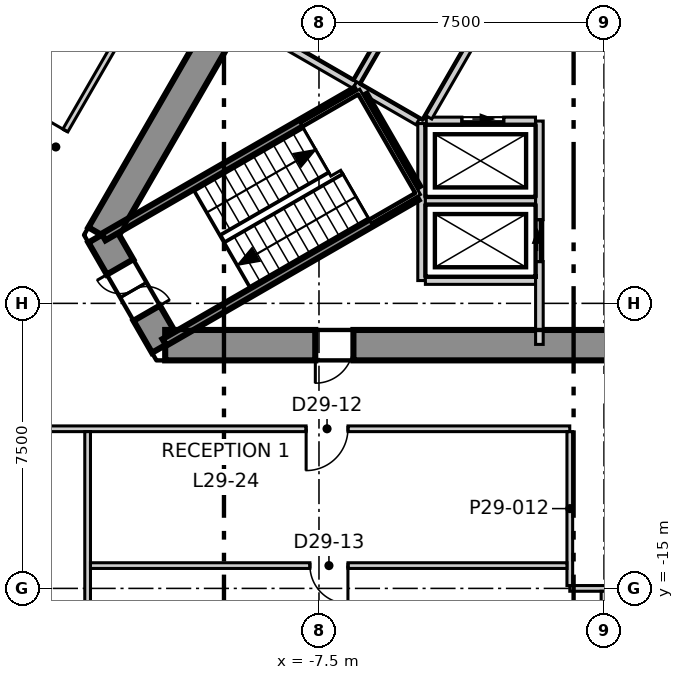
"""IFC4 building model, lengths in metres.
Left out: names, types, materials, properties, quantities, classifications, styles, units other than length and angle.
Written with IfcOpenShell. Run it as: python <this file> out.ifc"""

import sys

from ifc_helpers import new_model, si_unit, direction, frame, frame_2d, origin, place, context, subcontext, project, spatial, polyline, rectangle, outline, extrude, element, fill, save


model = new_model("IFC4")
c1 = context("Model", 3, precision=1e-05, world=origin(), true_north=direction((0.0, 1.0)))
c2 = subcontext(c1, "Body", "Model", "MODEL_VIEW")
j1 = project(units=[si_unit("LENGTHUNIT", "METRE"), si_unit("PLANEANGLEUNIT", "RADIAN")], contexts=[c1])
p1 = place(None, origin())
s1 = spatial("IfcSite", under=j1, at=p1, CompositionType="ELEMENT")
p2 = place(p1, origin())
s2 = spatial("IfcBuilding", under=s1, at=p2, CompositionType="ELEMENT")
p3 = place(p2, frame((0.0, 0.0, 128.3)))
s3 = spatial("IfcBuildingStorey", under=s2, at=p3, CompositionType="ELEMENT", Elevation=128.3)
p4 = place(p3, frame((-1.674, 14.3, -0.3), z_axis=(0.0, 0.0, 1.0), x_axis=(-0.499995765644, -0.866027848477, 0.0)))
e1 = element("IfcWall", 1, at=p4, inside=s3, PredefinedType="SHEAR", context=c2, shape_type="SweptSolid", body=[
    extrude(outline(polyline([(-0.231, -0.4), (1.732, -0.4), (3.695, -0.4), (5.658, -0.4), (7.621, -0.4), (9.584, -0.4), (11.547, -0.4), (13.51, -0.4), (15.473, -0.4), (17.436, -0.4), (19.399, -0.4), (21.362, -0.4), (23.325, -0.4), (22.863, 0.4), (20.977, 0.4), (19.091, 0.4), (17.205, 0.4), (15.319, 0.4), (13.433, 0.4), (11.547, 0.4), (9.661, 0.4), (7.775, 0.4), (5.889, 0.4), (4.003, 0.4), (2.117, 0.4), (0.231, 0.4), (-0.231, -0.4)])), origin(), (0.0, 0.0, 1.0), 4.0),
])
p5 = place(p4, frame((10.997, 0.0, 0.3)))
e2 = element("IfcOpeningElement", 2, at=p5, cuts=e1, PredefinedType="OPENING", context=c2, shape_type="SweptSolid", body=[
    extrude(rectangle(XDim=1.1, YDim=2.1, at=frame_2d((0.55, 1.05))), frame((0.0, 0.41, 0.0), z_axis=(0.0, -1.0, 0.0), x_axis=(1.0, 0.0, 0.0)), (0.0, 0.0, 1.0), 0.82),
])
p6 = place(p4, frame((5.444, 0.0, 0.3)))
e3 = element("IfcOpeningElement", 3, at=p6, cuts=e1, PredefinedType="OPENING", context=c2, shape_type="SweptSolid", body=[
    extrude(rectangle(XDim=0.9, YDim=2.1, at=frame_2d((0.45, 1.05))), frame((0.0, 0.41, 0.0), z_axis=(0.0, -1.0, 0.0), x_axis=(1.0, 0.0, 0.0)), (0.0, 0.0, 1.0), 0.82),
])
p7 = place(p3, frame((-13.221, -5.7, -0.3), z_axis=(0.0, 0.0, 1.0), x_axis=(0.49987182685, -0.866099391942, 0.0)))
e4 = element("IfcWall", 4, at=p7, inside=s3, PredefinedType="SHEAR", context=c2, shape_type="SweptSolid", body=[
    extrude(outline(polyline([(-0.231, -0.4), (1.674, -0.4), (3.579, -0.4), (3.118, 0.4), (1.674, 0.4), (0.231, 0.4), (-0.231, -0.4)])), origin(), (0.0, 0.0, 1.0), 4.0),
])
p8 = place(p7, frame((0.974, 0.0, 0.3)))
e5 = element("IfcOpeningElement", 5, at=p8, cuts=e4, PredefinedType="OPENING", context=c2, shape_type="SweptSolid", body=[
    extrude(rectangle(XDim=1.4, YDim=2.1, at=frame_2d((0.7, 1.05))), frame((0.0, 0.41, 0.0), z_axis=(0.0, -1.0, 0.0), x_axis=(1.0, 0.0, 0.0)), (0.0, 0.0, 1.0), 0.82),
])
p9 = place(p3, frame((-11.547, -8.6, -0.3), z_axis=(0.0, 0.0, 1.0), x_axis=(1.0, 0.0, 0.0)))
e6 = element("IfcWall", 6, at=p9, inside=s3, PredefinedType="SHEAR", context=c2, shape_type="SweptSolid", body=[
    extrude(outline(polyline([(-0.231, -0.4), (1.732, -0.4), (3.695, -0.4), (5.658, -0.4), (7.621, -0.4), (9.584, -0.4), (11.547, -0.4), (13.51, -0.4), (15.473, -0.4), (17.436, -0.4), (19.399, -0.4), (21.362, -0.4), (23.325, -0.4), (22.863, 0.4), (20.977, 0.4), (19.091, 0.4), (17.205, 0.4), (15.319, 0.4), (13.433, 0.4), (11.547, 0.4), (9.661, 0.4), (7.775, 0.4), (5.889, 0.4), (4.003, 0.4), (2.117, 0.4), (0.231, 0.4), (-0.231, -0.4)])), origin(), (0.0, 0.0, 1.0), 4.0),
])
p10 = place(p9, frame((3.951, 0.0, 0.3)))
e7 = element("IfcOpeningElement", 7, at=p10, cuts=e6, PredefinedType="OPENING", context=c2, shape_type="SweptSolid", body=[
    extrude(rectangle(XDim=1.0, YDim=2.1, at=frame_2d((0.5, 1.05))), frame((0.0, 0.41, 0.0), z_axis=(0.0, -1.0, 0.0), x_axis=(1.0, 0.0, 0.0)), (0.0, 0.0, 1.0), 0.82),
])
p11 = place(p9, frame((17.722, 0.0, 0.3)))
e8 = element("IfcOpeningElement", 8, at=p11, cuts=e6, PredefinedType="OPENING", context=c2, shape_type="SweptSolid", body=[
    extrude(rectangle(XDim=0.9, YDim=2.1, at=frame_2d((0.45, 1.05))), frame((0.0, 0.41, 0.0), z_axis=(0.0, -1.0, 0.0), x_axis=(1.0, 0.0, 0.0)), (0.0, 0.0, 1.0), 0.82),
])
p12 = place(p3, frame((-3.109, 34.679, 0.0), z_axis=(0.0, 0.0, 1.0), x_axis=(-0.50000689325, -0.866021423928, 0.0)))
e9 = element("IfcWall", 9, at=p12, inside=s3, PredefinedType="ELEMENTEDWALL", context=c2, shape_type="SweptSolid", body=[
    extrude(rectangle(XDim=56.937, YDim=0.2, at=frame_2d((28.469, 0.0))), origin(), (0.0, 0.0, 1.0), 3.7),
])
p13 = place(p12, frame((2.249, 0.0, 0.9)))
e10 = element("IfcOpeningElement", 10, at=p13, cuts=e9, PredefinedType="OPENING", context=c2, shape_type="SweptSolid", body=[
    extrude(rectangle(XDim=4.9, YDim=2.5, at=frame_2d((2.45, 1.25))), frame((0.0, 0.11, 0.0), z_axis=(0.0, -1.0, 0.0), x_axis=(1.0, 0.0, 0.0)), (0.0, 0.0, 1.0), 0.22),
])
p14 = place(p12, frame((9.043, 0.0, 0.9)))
e11 = element("IfcOpeningElement", 11, at=p14, cuts=e9, PredefinedType="OPENING", context=c2, shape_type="SweptSolid", body=[
    extrude(rectangle(XDim=4.9, YDim=2.5, at=frame_2d((2.45, 1.25))), frame((0.0, 0.11, 0.0), z_axis=(0.0, -1.0, 0.0), x_axis=(1.0, 0.0, 0.0)), (0.0, 0.0, 1.0), 0.22),
])
p15 = place(p12, frame((15.837, 0.0, 0.9)))
e12 = element("IfcOpeningElement", 12, at=p15, cuts=e9, PredefinedType="OPENING", context=c2, shape_type="SweptSolid", body=[
    extrude(rectangle(XDim=4.9, YDim=2.5, at=frame_2d((2.45, 1.25))), frame((0.0, 0.11, 0.0), z_axis=(0.0, -1.0, 0.0), x_axis=(1.0, 0.0, 0.0)), (0.0, 0.0, 1.0), 0.22),
])
p16 = place(p12, frame((22.631, 0.0, 0.9)))
e13 = element("IfcOpeningElement", 13, at=p16, cuts=e9, PredefinedType="OPENING", context=c2, shape_type="SweptSolid", body=[
    extrude(rectangle(XDim=4.9, YDim=2.5, at=frame_2d((2.45, 1.25))), frame((0.0, 0.11, 0.0), z_axis=(0.0, -1.0, 0.0), x_axis=(1.0, 0.0, 0.0)), (0.0, 0.0, 1.0), 0.22),
])
p17 = place(p12, frame((29.425, 0.0, 0.9)))
e14 = element("IfcOpeningElement", 14, at=p17, cuts=e9, PredefinedType="OPENING", context=c2, shape_type="SweptSolid", body=[
    extrude(rectangle(XDim=4.9, YDim=2.5, at=frame_2d((2.45, 1.25))), frame((0.0, 0.11, 0.0), z_axis=(0.0, -1.0, 0.0), x_axis=(1.0, 0.0, 0.0)), (0.0, 0.0, 1.0), 0.22),
])
p18 = place(p12, frame((36.219, 0.0, 0.9)))
e15 = element("IfcOpeningElement", 15, at=p18, cuts=e9, PredefinedType="OPENING", context=c2, shape_type="SweptSolid", body=[
    extrude(rectangle(XDim=4.9, YDim=2.5, at=frame_2d((2.45, 1.25))), frame((0.0, 0.11, 0.0), z_axis=(0.0, -1.0, 0.0), x_axis=(1.0, 0.0, 0.0)), (0.0, 0.0, 1.0), 0.22),
])
p19 = place(p12, frame((43.013, 0.0, 0.9)))
e16 = element("IfcOpeningElement", 16, at=p19, cuts=e9, PredefinedType="OPENING", context=c2, shape_type="SweptSolid", body=[
    extrude(rectangle(XDim=4.9, YDim=2.5, at=frame_2d((2.45, 1.25))), frame((0.0, 0.11, 0.0), z_axis=(0.0, -1.0, 0.0), x_axis=(1.0, 0.0, 0.0)), (0.0, 0.0, 1.0), 0.22),
])
p20 = place(p12, frame((49.807, 0.0, 0.9)))
e17 = element("IfcOpeningElement", 17, at=p20, cuts=e9, PredefinedType="OPENING", context=c2, shape_type="SweptSolid", body=[
    extrude(rectangle(XDim=4.9, YDim=2.5, at=frame_2d((2.45, 1.25))), frame((0.0, 0.11, 0.0), z_axis=(0.0, -1.0, 0.0), x_axis=(1.0, 0.0, 0.0)), (0.0, 0.0, 1.0), 0.22),
])
p21 = place(p3, frame((-18.556, -10.8, 0.0), z_axis=(0.0, 0.0, 1.0), x_axis=(1.0, 0.0, 0.0)))
e18 = element("IfcWall", 18, at=p21, inside=s3, PredefinedType="PARTITIONING", context=c2, shape_type="SweptSolid", body=[
    extrude(rectangle(XDim=17.655, YDim=0.15, at=frame_2d((8.828, 0.0))), origin(), (0.0, 0.0, 1.0), 3.7),
])
p22 = place(p21, frame((1.9, 0.0, 0.0)))
e19 = element("IfcOpeningElement", 19, at=p22, cuts=e18, PredefinedType="OPENING", context=c2, shape_type="SweptSolid", body=[
    extrude(rectangle(XDim=1.1, YDim=2.1, at=frame_2d((0.55, 1.05))), frame((0.0, 0.085, 0.0), z_axis=(0.0, -1.0, 0.0), x_axis=(1.0, 0.0, 0.0)), (0.0, 0.0, 1.0), 0.17),
])
p23 = place(p21, frame((10.718, 0.0, 0.0)))
e20 = element("IfcOpeningElement", 20, at=p23, cuts=e18, PredefinedType="OPENING", context=c2, shape_type="SweptSolid", body=[
    extrude(rectangle(XDim=1.1, YDim=2.1, at=frame_2d((0.55, 1.05))), frame((0.0, 0.085, 0.0), z_axis=(0.0, -1.0, 0.0), x_axis=(1.0, 0.0, 0.0)), (0.0, 0.0, 1.0), 0.17),
])
p24 = place(p3, frame((-18.631, -10.67, 0.0), z_axis=(0.0, 0.0, 1.0), x_axis=(0.499976222121, 0.866039131514, 0.0)))
e21 = element("IfcWall", 21, at=p24, inside=s3, PredefinedType="PARTITIONING", context=c2, shape_type="SweptSolid", body=[
    extrude(rectangle(XDim=17.655, YDim=0.15, at=frame_2d((8.828, 0.0))), origin(), (0.0, 0.0, 1.0), 3.7),
])
p25 = place(p24, frame((14.206, 0.0, 0.0)))
e22 = element("IfcOpeningElement", 22, at=p25, cuts=e21, PredefinedType="OPENING", context=c2, shape_type="SweptSolid", body=[
    extrude(rectangle(XDim=1.0, YDim=2.1, at=frame_2d((0.5, 1.05))), frame((0.0, 0.085, 0.0), z_axis=(0.0, -1.0, 0.0), x_axis=(1.0, 0.0, 0.0)), (0.0, 0.0, 1.0), 0.17),
])
p26 = place(p24, frame((7.912, 0.0, 0.0)))
e23 = element("IfcOpeningElement", 23, at=p26, cuts=e21, PredefinedType="OPENING", context=c2, shape_type="SweptSolid", body=[
    extrude(rectangle(XDim=1.0, YDim=2.1, at=frame_2d((0.5, 1.05))), frame((0.0, 0.085, 0.0), z_axis=(0.0, -1.0, 0.0), x_axis=(1.0, 0.0, 0.0)), (0.0, 0.0, 1.0), 0.17),
])
p27 = place(p24, frame((1.818, 0.0, 0.0)))
e24 = element("IfcOpeningElement", 24, at=p27, cuts=e21, PredefinedType="OPENING", context=c2, shape_type="SweptSolid", body=[
    extrude(rectangle(XDim=1.1, YDim=2.1, at=frame_2d((0.55, 1.05))), frame((0.0, 0.085, 0.0), z_axis=(0.0, -1.0, 0.0), x_axis=(1.0, 0.0, 0.0)), (0.0, 0.0, 1.0), 0.17),
])
p28 = place(p3, frame((-13.588, -19.952, 0.0), z_axis=(0.0, 0.0, 1.0), x_axis=(0.0, 1.0, 0.0)))
e25 = element("IfcWall", 25, at=p28, inside=s3, PredefinedType="PARTITIONING", context=c2, shape_type="SweptSolid", body=[
    extrude(rectangle(XDim=9.077, YDim=0.15, at=frame_2d((4.539, 0.0))), origin(), (0.0, 0.0, 1.0), 3.7),
])
p29 = place(p3, frame((-0.9, -15.0, 0.0), z_axis=(0.0, 0.0, 1.0), x_axis=(1.0, 0.0, 0.0)))
e26 = element("IfcWall", 26, at=p29, inside=s3, PredefinedType="PARTITIONING", context=c2, shape_type="SweptSolid", body=[
    extrude(rectangle(XDim=1.8, YDim=0.15, at=frame_2d((0.9, 0.0))), origin(), (0.0, 0.0, 1.0), 3.7),
])
p30 = place(p3, frame((-0.9, -14.925, 0.0), z_axis=(0.0, 0.0, 1.0), x_axis=(0.0, 1.0, 0.0)))
e27 = element("IfcWall", 27, at=p30, inside=s3, PredefinedType="PARTITIONING", context=c2, shape_type="SweptSolid", body=[
    extrude(rectangle(XDim=4.049, YDim=0.15, at=frame_2d((2.024, 0.0))), origin(), (0.0, 0.0, 1.0), 3.7),
])
p31 = place(p3, frame((0.0, -19.952, 0.0), z_axis=(0.0, 0.0, 1.0), x_axis=(0.0, 1.0, 0.0)))
e28 = element("IfcWall", 28, at=p31, inside=s3, PredefinedType="PARTITIONING", context=c2, shape_type="SweptSolid", body=[
    extrude(rectangle(XDim=4.877, YDim=0.15, at=frame_2d((2.438, 0.0))), origin(), (0.0, 0.0, 1.0), 3.2),
])
p32 = place(p3, frame((-13.513, -14.4, 0.0), z_axis=(0.0, 0.0, 1.0), x_axis=(1.0, 0.0, 0.0)))
e29 = element("IfcWall", 29, at=p32, inside=s3, PredefinedType="PARTITIONING", context=c2, shape_type="SweptSolid", body=[
    extrude(rectangle(XDim=12.538, YDim=0.15, at=frame_2d((6.269, 0.0))), origin(), (0.0, 0.0, 1.0), 3.7),
])
p33 = place(p32, frame((5.775, 0.0, 0.0)))
e30 = element("IfcOpeningElement", 30, at=p33, cuts=e29, PredefinedType="OPENING", context=c2, shape_type="SweptSolid", body=[
    extrude(rectangle(XDim=1.0, YDim=2.1, at=frame_2d((0.5, 1.05))), frame((0.0, 0.085, 0.0), z_axis=(0.0, -1.0, 0.0), x_axis=(1.0, 0.0, 0.0)), (0.0, 0.0, 1.0), 0.17),
])
p34 = place(p3, frame((-8.376, -0.707, 0.0), z_axis=(0.0, 0.0, 1.0), x_axis=(0.866067520717, -0.499927044236, 0.0)))
e31 = element("IfcWall", 31, at=p34, inside=s3, PredefinedType="SOLIDWALL", context=c2, shape_type="SweptSolid", body=[
    extrude(rectangle(XDim=2.1, YDim=0.2, at=frame_2d((1.05, 0.0))), origin(), (0.0, 0.0, 1.0), 3.7),
])
p35 = place(p3, frame((-4.8, -6.9, 0.0), z_axis=(0.0, 0.0, 1.0), x_axis=(0.0, 1.0, 0.0)))
e32 = element("IfcWall", 32, at=p35, inside=s3, PredefinedType="SOLIDWALL", context=c2, shape_type="SweptSolid", body=[
    extrude(rectangle(XDim=4.131, YDim=0.2, at=frame_2d((2.065, 0.0))), origin(), (0.0, 0.0, 1.0), 3.7),
])
for number, where, z_axis, x_axis in (
    (33, (-4.7, -6.9, 0.0), (0.0, 0.0, 1.0), (1.0, 0.0, 0.0)),
    (34, (-4.7, -4.8, 0.0), (0.0, 0.0, 1.0), (1.0, 0.0, 0.0)),
):
    element("IfcWall", number, at=place(p3, frame(where, z_axis=z_axis, x_axis=x_axis)), inside=s3, PredefinedType="SOLIDWALL", context=c2, shape_type="SweptSolid", body=[
        extrude(rectangle(XDim=2.9, YDim=0.2, at=frame_2d((1.45, 0.0))), origin(), (0.0, 0.0, 1.0), 3.7),
    ])
p36 = place(p3, frame((-1.7, -8.58, 0.0), z_axis=(0.0, 0.0, 1.0), x_axis=(0.0, 1.0, 0.0)))
e35 = element("IfcWall", 35, at=p36, inside=s3, PredefinedType="SOLIDWALL", context=c2, shape_type="SweptSolid", body=[
    extrude(rectangle(XDim=5.877, YDim=0.2, at=frame_2d((2.938, 0.0))), origin(), (0.0, 0.0, 1.0), 3.7),
])
p37 = place(p36, frame((2.18, 0.0, 0.0)))
e36 = element("IfcOpeningElement", 36, at=p37, cuts=e35, PredefinedType="OPENING", context=c2, shape_type="SweptSolid", body=[
    extrude(rectangle(XDim=1.1, YDim=2.1, at=frame_2d((0.55, 1.05))), frame((0.0, 0.11, 0.0), z_axis=(0.0, -1.0, 0.0), x_axis=(1.0, 0.0, 0.0)), (0.0, 0.0, 1.0), 0.22),
])
p38 = place(p3, frame((-4.676, -2.7, 0.0), z_axis=(0.0, 0.0, 1.0), x_axis=(1.0, 0.0, 0.0)))
e37 = element("IfcWall", 37, at=p38, inside=s3, PredefinedType="SOLIDWALL", context=c2, shape_type="SweptSolid", body=[
    extrude(rectangle(XDim=2.873, YDim=0.2, at=frame_2d((1.437, 0.0))), origin(), (0.0, 0.0, 1.0), 3.7),
])
p39 = place(p38, frame((0.937, 0.0, 0.0)))
e38 = element("IfcOpeningElement", 38, at=p39, cuts=e37, PredefinedType="OPENING", context=c2, shape_type="SweptSolid", body=[
    extrude(rectangle(XDim=1.1, YDim=2.1, at=frame_2d((0.55, 1.05))), frame((0.0, 0.11, 0.0), z_axis=(0.0, -1.0, 0.0), x_axis=(1.0, 0.0, 0.0)), (0.0, 0.0, 1.0), 0.22),
])
p40 = place(p3, frame((-6.557, -1.757, 0.0), z_axis=(0.0, 0.0, 1.0), x_axis=(0.8659754619, -0.500086491905, 0.0)))
e39 = element("IfcWall", 39, at=p40, inside=s3, PredefinedType="SOLIDWALL", context=c2, shape_type="SweptSolid", body=[
    extrude(rectangle(XDim=1.916, YDim=0.2, at=frame_2d((0.958, 0.0))), origin(), (0.0, 0.0, 1.0), 3.7),
])
p41 = place(p3, frame((-6.507, -1.67, 0.0), z_axis=(0.0, 0.0, 1.0), x_axis=(0.50012328804, 0.865954211699, 0.0)))
e40 = element("IfcWall", 40, at=p41, inside=s3, PredefinedType="SOLIDWALL", context=c2, shape_type="SweptSolid", body=[
    extrude(rectangle(XDim=2.9, YDim=0.2, at=frame_2d((1.45, 0.0))), origin(), (0.0, 0.0, 1.0), 3.7),
])
p42 = place(p3, frame((-4.619, -2.6, 0.0), z_axis=(0.0, 0.0, 1.0), x_axis=(0.50009492287, 0.865970593103, 0.0)))
e41 = element("IfcWall", 41, at=p42, inside=s3, PredefinedType="SOLIDWALL", context=c2, shape_type="SweptSolid", body=[
    extrude(rectangle(XDim=2.761, YDim=0.2, at=frame_2d((1.381, 0.0))), origin(), (0.0, 0.0, 1.0), 3.7),
])
p43 = place(p3, frame((-13.167, -5.754, 0.0), z_axis=(0.0, 0.0, 1.0), x_axis=(0.866060938598, 0.499938446846, 0.0)))
e42 = element("IfcWall", 42, at=p43, inside=s3, PredefinedType="SOLIDWALL", context=c2, shape_type="SweptSolid", body=[
    extrude(rectangle(XDim=7.665, YDim=0.2, at=frame_2d((3.832, 0.0))), origin(), (0.0, 0.0, 1.0), 3.7),
])
p44 = place(p3, frame((-6.329, -2.038, 0.0), z_axis=(0.0, 0.0, 1.0), x_axis=(0.500200581029, -0.865909567298, 0.0)))
e43 = element("IfcWall", 43, at=p44, inside=s3, PredefinedType="SOLIDWALL", context=c2, shape_type="SweptSolid", body=[
    extrude(rectangle(XDim=2.799, YDim=0.2, at=frame_2d((1.399, 0.0))), origin(), (0.0, 0.0, 1.0), 3.7),
])
p45 = place(p3, frame((-11.567, -8.526, 0.0), z_axis=(0.0, 0.0, 1.0), x_axis=(0.866005769735, 0.50003400563, 0.0)))
e44 = element("IfcWall", 44, at=p45, inside=s3, PredefinedType="SOLIDWALL", context=c2, shape_type="SweptSolid", body=[
    extrude(rectangle(XDim=7.665, YDim=0.2, at=frame_2d((3.833, 0.0))), origin(), (0.0, 0.0, 1.0), 3.7),
])
p46 = place(p39, origin())
e45 = element("IfcDoor", 45, at=p46, inside=s3, OperationType="SLIDING_TO_LEFT", PredefinedType="DOOR", context=c2, shape_type="SweptSolid", body=[
    extrude(rectangle(XDim=1.1, YDim=2.1, at=frame_2d((0.55, 1.05))), frame((0.0, 0.025, 0.0), z_axis=(0.0, -1.0, 0.0), x_axis=(1.0, 0.0, 0.0)), (0.0, 0.0, 1.0), 0.05),
])
fill(e38, e45)
p47 = place(p37, origin())
e46 = element("IfcDoor", 46, at=p47, inside=s3, OperationType="SLIDING_TO_LEFT", PredefinedType="DOOR", context=c2, shape_type="SweptSolid", body=[
    extrude(rectangle(XDim=1.1, YDim=2.1, at=frame_2d((0.55, 1.05))), frame((0.0, 0.025, 0.0), z_axis=(0.0, -1.0, 0.0), x_axis=(1.0, 0.0, 0.0)), (0.0, 0.0, 1.0), 0.05),
])
fill(e36, e46)
p48 = place(p23, origin())
e47 = element("IfcDoor", 47, at=p48, inside=s3, OperationType="SINGLE_SWING_LEFT", PredefinedType="DOOR", context=c2, shape_type="SweptSolid", body=[
    extrude(rectangle(XDim=1.1, YDim=2.1, at=frame_2d((0.55, 1.05))), frame((0.0, 0.025, 0.0), z_axis=(0.0, -1.0, 0.0), x_axis=(1.0, 0.0, 0.0)), (0.0, 0.0, 1.0), 0.05),
])
fill(e20, e47)
p49 = place(p33, origin())
e48 = element("IfcDoor", 48, at=p49, inside=s3, OperationType="SINGLE_SWING_RIGHT", PredefinedType="DOOR", context=c2, shape_type="SweptSolid", body=[
    extrude(rectangle(XDim=1.0, YDim=2.1, at=frame_2d((0.5, 1.05))), frame((0.0, 0.025, 0.0), z_axis=(0.0, -1.0, 0.0), x_axis=(1.0, 0.0, 0.0)), (0.0, 0.0, 1.0), 0.05),
])
fill(e30, e48)
p50 = place(p26, origin())
e49 = element("IfcDoor", 49, at=p50, inside=s3, OperationType="SINGLE_SWING_LEFT", PredefinedType="DOOR", context=c2, shape_type="SweptSolid", body=[
    extrude(rectangle(XDim=1.0, YDim=2.1, at=frame_2d((0.5, 1.05))), frame((0.0, 0.025, 0.0), z_axis=(0.0, -1.0, 0.0), x_axis=(1.0, 0.0, 0.0)), (0.0, 0.0, 1.0), 0.05),
])
fill(e23, e49)
p51 = place(p8, origin())
e50 = element("IfcDoor", 50, at=p51, inside=s3, OperationType="DOUBLE_DOOR_SINGLE_SWING", PredefinedType="DOOR", context=c2, shape_type="SweptSolid", body=[
    extrude(rectangle(XDim=1.4, YDim=2.1, at=frame_2d((0.7, 1.05))), frame((0.0, 0.025, 0.0), z_axis=(0.0, -1.0, 0.0), x_axis=(1.0, 0.0, 0.0)), (0.0, 0.0, 1.0), 0.05),
])
fill(e5, e50)
p52 = place(p10, origin())
e51 = element("IfcDoor", 51, at=p52, inside=s3, OperationType="SINGLE_SWING_LEFT", PredefinedType="DOOR", context=c2, shape_type="SweptSolid", body=[
    extrude(rectangle(XDim=1.0, YDim=2.1, at=frame_2d((0.5, 1.05))), frame((0.0, 0.125, 0.0), z_axis=(0.0, -1.0, 0.0), x_axis=(1.0, 0.0, 0.0)), (0.0, 0.0, 1.0), 0.05),
])
fill(e7, e51)
save(model, sys.argv[1])
